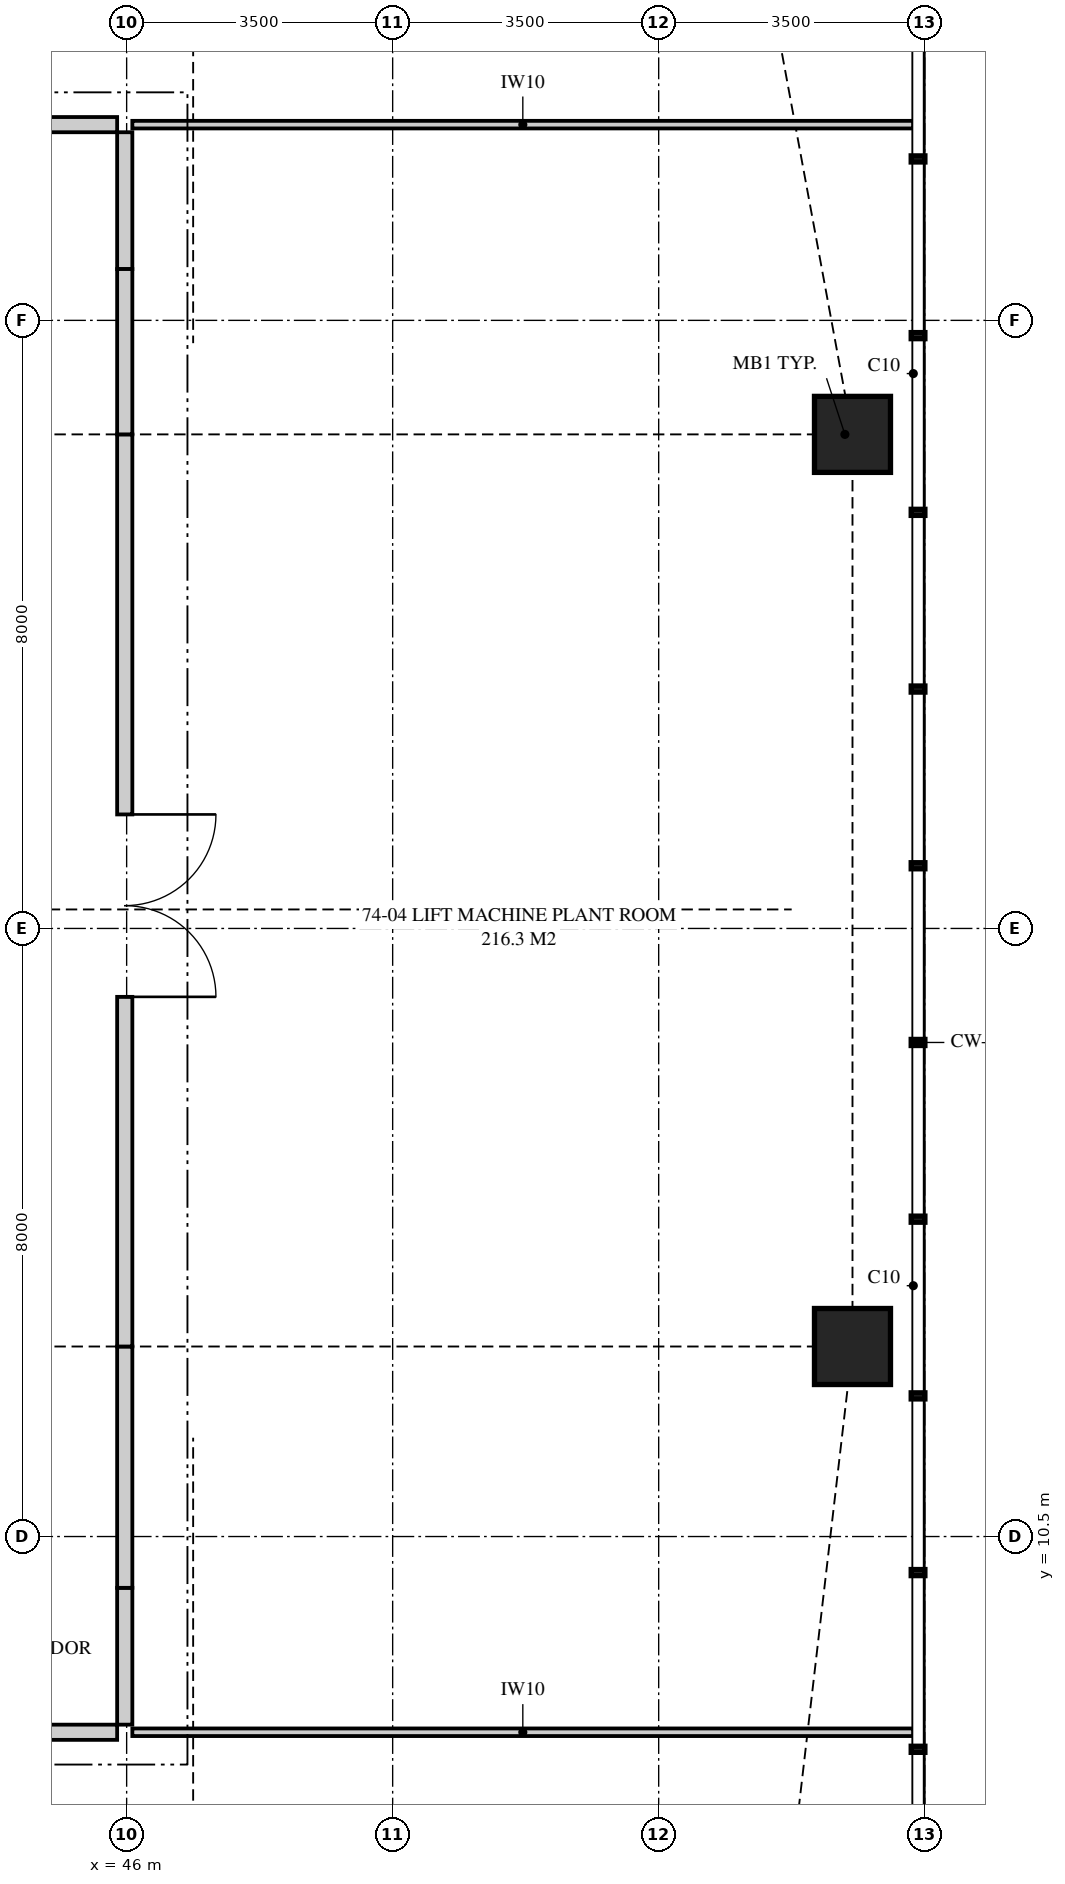
"""IFC4 building model, lengths in metres.
Left out: names, types, materials, properties, quantities, classifications, styles, units other than length and angle.
Written with IfcOpenShell. Run it as: python <this file> out.ifc"""

import sys

from ifc_helpers import new_model, si_unit, direction, frame, frame_2d, origin, origin_2d, place, context, subcontext, project, spatial, polyline, rectangle, outline, extrude, element, fill, save


model = new_model("IFC4")
c1 = context("Model", 3, precision=1e-05, world=origin(), true_north=direction((0.0, 1.0)))
c2 = subcontext(c1, "Body", "Model", "MODEL_VIEW")
j1 = project(units=[si_unit("LENGTHUNIT", "METRE"), si_unit("PLANEANGLEUNIT", "RADIAN")], contexts=[c1])
p1 = place(None, origin())
s1 = spatial("IfcSite", under=j1, at=p1, CompositionType="ELEMENT")
p2 = place(p1, origin())
s2 = spatial("IfcBuilding", under=s1, at=p2, CompositionType="ELEMENT")
p3 = place(p2, frame((0.0, 0.0, 272.75)))
s3 = spatial("IfcBuildingStorey", under=s2, at=p3, CompositionType="ELEMENT", Elevation=272.75)
for number, where, z_axis, x_axis in (
    (1, (55.55, 13.0, 0.0), (0.0, 0.0, 1.0), (1.0, 0.0, 0.0)),
    (2, (55.55, 25.0, 0.0), (0.0, 0.0, 1.0), (1.0, 0.0, 0.0)),
):
    element("IfcColumn", number, at=place(p3, frame(where, z_axis=z_axis, x_axis=x_axis)), inside=s3, PredefinedType="COLUMN", context=c2, shape_type="SweptSolid", body=[
        extrude(rectangle(XDim=1.0, YDim=1.0, at=origin_2d()), origin(), (0.0, 0.0, 1.0), 5.0),
    ])
p4 = place(p3, frame((17.825, 7.925, 0.0), z_axis=(0.0, 0.0, 1.0), x_axis=(1.0, 0.0, 0.0)))
e3 = element("IfcWall", 3, at=p4, inside=s3, PredefinedType="PARTITIONING", context=c2, shape_type="SweptSolid", body=[
    extrude(outline(polyline([(0.0, 0.0), (28.05, 0.0), (28.05, 4.72), (28.05, 4.12), (27.74, 4.12), (27.74, 4.72), (20.735, 4.72), (20.735, 4.12), (18.115, 4.12), (18.115, 4.72), (11.11, 4.72), (11.11, 4.12), (8.49, 4.12), (8.49, 4.72), (3.692, 4.72), (3.692, 4.12), (2.014, 4.12), (2.014, 3.5), (0.147, 3.5), (0.147, 4.72), (0.0, 4.72), (0.0, 0.0)])), frame((0.0, 0.1, 0.0), z_axis=(0.0, -1.0, 0.0), x_axis=(1.0, 0.0, 0.0)), (0.0, 0.0, 1.0), 0.2),
])
p5 = place(p4, frame((13.175, 0.0, 0.0)))
e4 = element("IfcOpeningElement", 4, at=p5, cuts=e3, PredefinedType="OPENING", context=c2, shape_type="SweptSolid", body=[
    extrude(rectangle(XDim=2.4, YDim=2.4, at=frame_2d((1.2, 1.2))), frame((0.0, 0.11, 0.0), z_axis=(0.0, -1.0, 0.0), x_axis=(1.0, 0.0, 0.0)), (0.0, 0.0, 1.0), 0.22),
])
p6 = place(p3, frame((45.975, 8.025, 0.0), z_axis=(0.0, 0.0, 1.0), x_axis=(0.0, 1.0, 0.0)))
e5 = element("IfcWall", 5, at=p6, inside=s3, PredefinedType="PARTITIONING", context=c2, shape_type="SweptSolid", body=[
    extrude(outline(polyline([(0.0, 0.0), (1.8, 0.0), (1.8, 4.72), (1.8, 4.12), (0.0, 4.12), (0.0, 4.72), (0.0, 0.0)])), frame((0.0, 0.1, 0.0), z_axis=(0.0, -1.0, 0.0), x_axis=(1.0, 0.0, 0.0)), (0.0, 0.0, 1.0), 0.2),
])
p7 = place(p3, frame((17.825, 29.075, 0.0), z_axis=(0.0, 0.0, 1.0), x_axis=(1.0, 0.0, 0.0)))
e6 = element("IfcWall", 6, at=p7, inside=s3, PredefinedType="PARTITIONING", context=c2, shape_type="SweptSolid", body=[
    extrude(outline(polyline([(0.0, 0.0), (28.05, 0.0), (28.05, 4.72), (28.05, 4.12), (27.74, 4.12), (27.74, 4.72), (20.735, 4.72), (20.735, 4.12), (18.115, 4.12), (18.115, 4.72), (11.11, 4.72), (11.11, 4.12), (8.49, 4.12), (8.49, 4.72), (3.692, 4.72), (3.692, 4.12), (2.367, 4.12), (2.367, 3.5), (0.431, 3.5), (0.431, 4.72), (0.0, 4.72), (0.0, 0.0)])), frame((0.0, 0.1, 0.0), z_axis=(0.0, -1.0, 0.0), x_axis=(1.0, 0.0, 0.0)), (0.0, 0.0, 1.0), 0.2),
])
p8 = place(p7, frame((13.175, 0.0, 0.0)))
e7 = element("IfcOpeningElement", 7, at=p8, cuts=e6, PredefinedType="OPENING", context=c2, shape_type="SweptSolid", body=[
    extrude(rectangle(XDim=2.4, YDim=2.4, at=frame_2d((1.2, 1.2))), frame((0.0, 0.11, 0.0), z_axis=(0.0, -1.0, 0.0), x_axis=(1.0, 0.0, 0.0)), (0.0, 0.0, 1.0), 0.22),
])
p9 = place(p3, frame((45.975, 27.175, 0.0), z_axis=(0.0, 0.0, 1.0), x_axis=(0.0, 1.0, 0.0)))
e8 = element("IfcWall", 8, at=p9, inside=s3, PredefinedType="PARTITIONING", context=c2, shape_type="SweptSolid", body=[
    extrude(outline(polyline([(0.0, 0.0), (1.8, 0.0), (1.8, 4.72), (1.8, 4.12), (0.0, 4.12), (0.0, 4.72), (0.0, 0.0)])), frame((0.0, 0.1, 0.0), z_axis=(0.0, -1.0, 0.0), x_axis=(1.0, 0.0, 0.0)), (0.0, 0.0, 1.0), 0.2),
])
p10 = place(p3, frame((45.975, 9.825, 0.0), z_axis=(0.0, 0.0, 1.0), x_axis=(0.0, 1.0, 0.0)))
e9 = element("IfcWall", 9, at=p10, inside=s3, PredefinedType="PARTITIONING", context=c2, shape_type="SweptSolid", body=[
    extrude(rectangle(XDim=3.175, YDim=0.2, at=frame_2d((1.587, 0.0))), origin(), (0.0, 0.0, 1.0), 4.12),
])
p11 = place(p3, frame((45.975, 13.0, 0.0), z_axis=(0.0, 0.0, 1.0), x_axis=(0.0, 1.0, 0.0)))
e10 = element("IfcWall", 10, at=p11, inside=s3, PredefinedType="PARTITIONING", context=c2, shape_type="SweptSolid", body=[
    extrude(outline(polyline([(0.0, 0.0), (12.0, 0.0), (12.0, 4.12), (10.69, 4.12), (10.69, 4.72), (7.06, 4.72), (7.06, 4.12), (4.44, 4.12), (4.44, 4.72), (1.31, 4.72), (1.31, 4.12), (0.0, 4.12), (0.0, 0.0)])), frame((0.0, 0.1, 0.0), z_axis=(0.0, -1.0, 0.0), x_axis=(1.0, 0.0, 0.0)), (0.0, 0.0, 1.0), 0.2),
])
p12 = place(p11, frame((4.6, 0.0, 0.0)))
e11 = element("IfcOpeningElement", 11, at=p12, cuts=e10, PredefinedType="OPENING", context=c2, shape_type="SweptSolid", body=[
    extrude(rectangle(XDim=2.4, YDim=2.4, at=frame_2d((1.2, 1.2))), frame((0.0, 0.11, 0.0), z_axis=(0.0, -1.0, 0.0), x_axis=(1.0, 0.0, 0.0)), (0.0, 0.0, 1.0), 0.22),
])
p13 = place(p3, frame((45.975, 25.0, 0.0), z_axis=(0.0, 0.0, 1.0), x_axis=(0.0, 1.0, 0.0)))
e12 = element("IfcWall", 12, at=p13, inside=s3, PredefinedType="PARTITIONING", context=c2, shape_type="SweptSolid", body=[
    extrude(rectangle(XDim=2.175, YDim=0.2, at=frame_2d((1.087, 0.0))), origin(), (0.0, 0.0, 1.0), 4.12),
])
p14 = place(p3, frame((46.075, 7.925, 0.0), z_axis=(0.0, 0.0, 1.0), x_axis=(1.0, 0.0, 0.0)))
e13 = element("IfcWall", 13, at=p14, inside=s3, PredefinedType="PARTITIONING", context=c2, shape_type="SweptSolid", body=[
    extrude(outline(polyline([(0.0, 0.0), (10.275, 0.0), (10.275, 4.72), (9.75, 4.72), (9.75, 3.5), (8.018, 3.5), (8.018, 4.72), (2.06, 4.72), (2.06, 4.12), (0.0, 4.12), (0.0, 4.72), (0.0, 0.0)])), frame((0.0, 0.05, 0.0), z_axis=(0.0, -1.0, 0.0), x_axis=(1.0, 0.0, 0.0)), (0.0, 0.0, 1.0), 0.1),
])
p15 = place(p3, frame((46.075, 29.075, 0.0), z_axis=(0.0, 0.0, 1.0), x_axis=(1.0, 0.0, 0.0)))
e14 = element("IfcWall", 14, at=p15, inside=s3, PredefinedType="PARTITIONING", context=c2, shape_type="SweptSolid", body=[
    extrude(outline(polyline([(0.0, 0.0), (10.275, 0.0), (10.275, 4.72), (9.595, 4.72), (9.595, 3.5), (7.846, 3.5), (7.846, 4.72), (2.06, 4.72), (2.06, 4.12), (0.0, 4.12), (0.0, 4.72), (0.0, 0.0)])), frame((0.0, 0.05, 0.0), z_axis=(0.0, -1.0, 0.0), x_axis=(1.0, 0.0, 0.0)), (0.0, 0.0, 1.0), 0.1),
])
p16 = place(p12, frame((2.4, 0.0, 0.0), z_axis=(0.0, 0.0, 1.0), x_axis=(-1.0, 0.0, 0.0)))
e15 = element("IfcDoor", 15, at=p16, inside=s3, OperationType="DOUBLE_DOOR_SINGLE_SWING", PredefinedType="DOOR", context=c2, shape_type="SweptSolid", body=[
    extrude(rectangle(XDim=2.4, YDim=2.4, at=frame_2d((1.2, 1.2))), frame((0.0, 0.025, 0.0), z_axis=(0.0, -1.0, 0.0), x_axis=(1.0, 0.0, 0.0)), (0.0, 0.0, 1.0), 0.05),
])
fill(e11, e15)
save(model, sys.argv[1])
